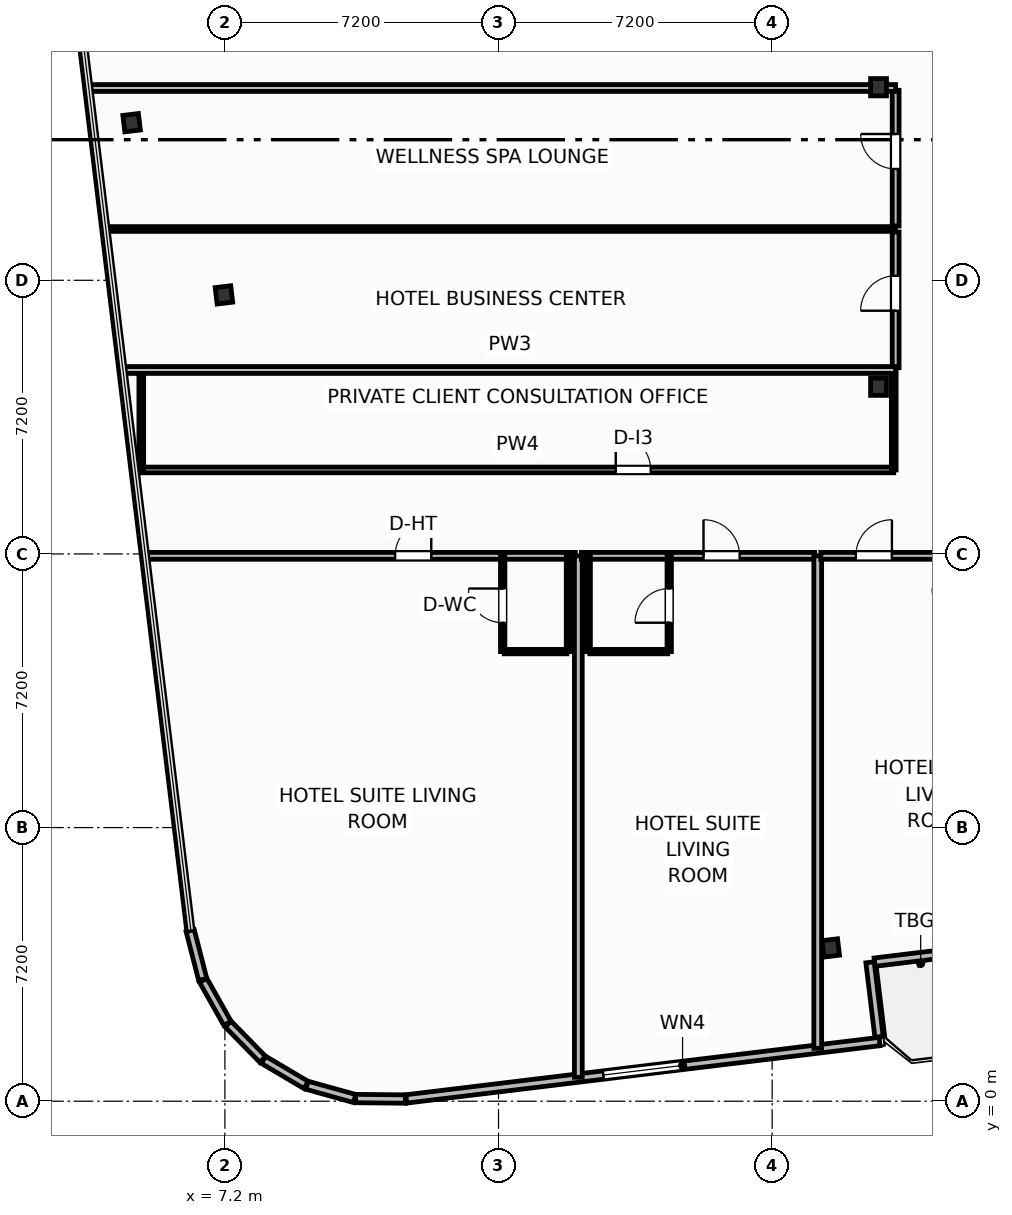
"""IFC4 building model, lengths in metres.
Left out: names, types, materials, properties, quantities, classifications, styles, units other than length and angle.
Written with IfcOpenShell. Run it as: python <this file> out.ifc"""

import sys

from ifc_helpers import new_model, si_unit, direction, frame, frame_2d, origin, origin_2d, place, context, subcontext, project, spatial, rectangle, i_section, extrude, element, fill, save


model = new_model("IFC4")
c1 = context("Model", 3, precision=1e-05, world=origin(), true_north=direction((0.0, 1.0)))
c2 = subcontext(c1, "Body", "Model", "MODEL_VIEW")
j1 = project(units=[si_unit("LENGTHUNIT", "METRE"), si_unit("PLANEANGLEUNIT", "RADIAN")], contexts=[c1])
p1 = place(None, origin())
s1 = spatial("IfcSite", under=j1, at=p1, CompositionType="ELEMENT")
p2 = place(p1, origin())
s2 = spatial("IfcBuilding", under=s1, at=p2, CompositionType="ELEMENT")
p3 = place(p2, frame((0.0, 0.0, 200.5)))
s3 = spatial("IfcBuildingStorey", under=s2, at=p3, CompositionType="ELEMENT", Elevation=200.5)
for number, where, z_axis, x_axis in (
    (1, (24.4, 18.8, 0.0), (0.0, 0.0, 1.0), (1.0, 0.0, 0.0)),
    (2, (24.4, 26.68, 0.0), (0.0, 0.0, 1.0), (1.0, 0.0, 0.0)),
):
    element("IfcColumn", number, at=place(p3, frame(where, z_axis=z_axis, x_axis=x_axis)), inside=s3, PredefinedType="COLUMN", context=c2, shape_type="SweptSolid", body=[
        extrude(i_section(OverallWidth=0.418, OverallDepth=0.455, WebThickness=0.042, FlangeThickness=0.068, FilletRadius=0.025, at=origin_2d()), origin(), (0.0, 0.0, 1.0), 3.7),
    ])
for number, where, z_axis, x_axis in (
    (3, (23.143, 4.033, 0.0), (0.0, 0.0, 1.0), (0.993, 0.12, 0.0)),
    (4, (4.746, 25.747, 0.0), (0.0, 0.0, 1.0), (0.993, 0.12, 0.0)),
    (5, (7.175, 21.216, 0.0), (0.0, 0.0, 1.0), (0.993, 0.12, 0.0)),
):
    element("IfcColumn", number, at=place(p3, frame(where, z_axis=z_axis, x_axis=x_axis)), inside=s3, PredefinedType="COLUMN", context=c2, shape_type="SweptSolid", body=[
        extrude(i_section(OverallWidth=0.412, OverallDepth=0.435, WebThickness=0.036, FlangeThickness=0.057, FilletRadius=0.025, at=origin_2d()), origin(), (0.0, 0.0, 1.0), 3.7),
    ])
p4 = place(p3, frame((30.252, 4.381, 0.0), z_axis=(0.0, 0.0, 1.0), x_axis=(-0.992735402148, -0.120318000826, 0.0)))
e6 = element("IfcWall", 6, at=p4, inside=s3, PredefinedType="SOLIDWALL", context=c2, shape_type="SweptSolid", body=[
    extrude(rectangle(XDim=6.0, YDim=0.22, at=frame_2d((3.0, 0.0))), origin(), (0.0, 0.0, 1.0), 2.73),
])
p5 = place(p4, frame((2.012, 0.0, 0.0)))
e7 = element("IfcOpeningElement", 7, at=p5, cuts=e6, PredefinedType="OPENING", context=c2, shape_type="SweptSolid", body=[
    extrude(rectangle(XDim=2.1, YDim=2.3, at=frame_2d((1.05, 1.15))), frame((0.0, 0.12, 0.0), z_axis=(0.0, -1.0, 0.0), x_axis=(1.0, 0.0, 0.0)), (0.0, 0.0, 1.0), 0.24),
])
p6 = place(p3, frame((6.286, 4.488, 0.0), z_axis=(0.0, 0.0, 1.0), x_axis=(0.248942347653, -0.968518305219, 0.0)))
e8 = element("IfcWall", 8, at=p6, inside=s3, PredefinedType="SOLIDWALL", context=c2, shape_type="SweptSolid", body=[
    extrude(rectangle(XDim=1.326, YDim=0.22, at=frame_2d((0.663, 0.0))), origin(), (0.0, 0.0, 1.0), 2.73),
])
for number, where, z_axis, x_axis in (
    (9, (6.629, 3.182, 0.0), (0.0, 0.0, 1.0), (0.491, -0.871, 0.0)),
    (10, (7.285, 2.031, 0.0), (0.0, 0.0, 1.0), (0.7, -0.714, 0.0)),
    (11, (8.217, 1.089, 0.0), (0.0, 0.0, 1.0), (0.861, -0.509, 0.0)),
):
    element("IfcWall", number, at=place(p3, frame(where, z_axis=z_axis, x_axis=x_axis)), inside=s3, PredefinedType="SOLIDWALL", context=c2, shape_type="SweptSolid", body=[
        extrude(rectangle(XDim=1.301, YDim=0.22, at=frame_2d((0.65, 0.0))), origin(), (0.0, 0.0, 1.0), 2.73),
    ])
p7 = place(p3, frame((9.361, 0.42, 0.0), z_axis=(0.0, 0.0, 1.0), x_axis=(0.963218895288, -0.268717992997, 0.0)))
e12 = element("IfcWall", 12, at=p7, inside=s3, PredefinedType="SOLIDWALL", context=c2, shape_type="SweptSolid", body=[
    extrude(rectangle(XDim=1.301, YDim=0.22, at=frame_2d((0.65, 0.0))), origin(), (0.0, 0.0, 1.0), 2.73),
])
p8 = place(p3, frame((10.639, 0.07, 0.0), z_axis=(0.0, 0.0, 1.0), x_axis=(0.999947377741, -0.010258740119, 0.0)))
e13 = element("IfcWall", 13, at=p8, inside=s3, PredefinedType="SOLIDWALL", context=c2, shape_type="SweptSolid", body=[
    extrude(rectangle(XDim=1.309, YDim=0.22, at=frame_2d((0.654, 0.0))), origin(), (0.0, 0.0, 1.0), 2.73),
])
p9 = place(p3, frame((11.972, 0.06, 0.0), z_axis=(0.0, 0.0, 1.0), x_axis=(0.992732021049, 0.120345894751, 0.0)))
e14 = element("IfcWall", 14, at=p9, inside=s3, PredefinedType="SOLIDWALL", context=c2, shape_type="SweptSolid", body=[
    extrude(rectangle(XDim=12.547, YDim=0.22, at=frame_2d((6.274, 0.0))), origin(), (0.0, 0.0, 1.0), 2.73),
])
p10 = place(p9, frame((5.224, 0.0, 0.8)))
e15 = element("IfcOpeningElement", 15, at=p10, cuts=e14, PredefinedType="OPENING", context=c2, shape_type="SweptSolid", body=[
    extrude(rectangle(XDim=2.1, YDim=1.75, at=frame_2d((1.05, 0.875))), frame((0.0, 0.12, 0.0), z_axis=(0.0, -1.0, 0.0), x_axis=(1.0, 0.0, 0.0)), (0.0, 0.0, 1.0), 0.24),
])
p11 = place(p3, frame((24.413, 1.694, 0.0), z_axis=(0.0, 0.0, 1.0), x_axis=(-0.120290754542, 0.992738703976, 0.0)))
e16 = element("IfcWall", 16, at=p11, inside=s3, PredefinedType="SOLIDWALL", context=c2, shape_type="SweptSolid", body=[
    extrude(rectangle(XDim=1.975, YDim=0.22, at=frame_2d((0.987, 0.0))), origin(), (0.0, 0.0, 1.0), 2.73),
])
p12 = place(p3, frame((5.0, 16.61, 0.0), z_axis=(0.0, 0.0, 1.0), x_axis=(1.0, 0.0, 0.0)))
e17 = element("IfcWall", 17, at=p12, inside=s3, PredefinedType="PARTITIONING", context=c2, shape_type="SweptSolid", body=[
    extrude(rectangle(XDim=19.8, YDim=0.15, at=frame_2d((9.9, 0.0))), origin(), (0.0, 0.0, 1.0), 3.45),
])
p13 = place(p12, frame((12.485, 0.0, 0.0)))
e18 = element("IfcOpeningElement", 18, at=p13, cuts=e17, PredefinedType="OPENING", context=c2, shape_type="SweptSolid", body=[
    extrude(rectangle(XDim=0.92, YDim=2.05, at=frame_2d((0.46, 1.025))), frame((0.0, 0.085, 0.0), z_axis=(0.0, -1.0, 0.0), x_axis=(1.0, 0.0, 0.0)), (0.0, 0.0, 1.0), 0.17),
])
for number, where, z_axis, x_axis in (
    (19, (5.0, 16.61, 0.0), (0.0, 0.0, 1.0), (0.0, 1.0, 0.0)),
    (20, (24.8, 16.61, 0.0), (0.0, 0.0, 1.0), (0.0, 1.0, 0.0)),
):
    element("IfcWall", number, at=place(p3, frame(where, z_axis=z_axis, x_axis=x_axis)), inside=s3, PredefinedType="PARTITIONING", context=c2, shape_type="SweptSolid", body=[
        extrude(rectangle(XDim=2.63, YDim=0.125, at=frame_2d((1.315, 0.0))), origin(), (0.0, 0.0, 1.0), 3.45),
    ])
p14 = place(p3, frame((5.15, 14.35, 0.0), z_axis=(0.0, 0.0, 1.0), x_axis=(1.0, 0.0, 0.0)))
e21 = element("IfcWall", 21, at=p14, inside=s3, PredefinedType="PARTITIONING", context=c2, shape_type="SweptSolid", body=[
    extrude(rectangle(XDim=11.27, YDim=0.18, at=frame_2d((5.635, 0.0))), origin(), (0.0, 0.0, 1.0), 3.45),
])
p15 = place(p14, frame((6.53, 0.0, 0.0)))
e22 = element("IfcOpeningElement", 22, at=p15, cuts=e21, PredefinedType="OPENING", context=c2, shape_type="SweptSolid", body=[
    extrude(rectangle(XDim=0.95, YDim=2.15, at=frame_2d((0.475, 1.075))), frame((0.0, 0.1, 0.0), z_axis=(0.0, -1.0, 0.0), x_axis=(1.0, 0.0, 0.0)), (0.0, 0.0, 1.0), 0.2),
])
p16 = place(p3, frame((14.55, 11.83, 0.0), z_axis=(0.0, 0.0, 1.0), x_axis=(1.0, 0.0, 0.0)))
e23 = element("IfcWall", 23, at=p16, inside=s3, PredefinedType="PARTITIONING", context=c2, shape_type="SweptSolid", body=[
    extrude(rectangle(XDim=1.65, YDim=0.115, at=frame_2d((0.825, 0.0))), origin(), (0.0, 0.0, 1.0), 3.45),
])
p17 = place(p3, frame((14.51, 11.83, 0.0), z_axis=(0.0, 0.0, 1.0), x_axis=(0.0, 1.0, 0.0)))
e24 = element("IfcWall", 24, at=p17, inside=s3, PredefinedType="PARTITIONING", context=c2, shape_type="SweptSolid", body=[
    extrude(rectangle(XDim=2.52, YDim=0.115, at=frame_2d((1.26, 0.0))), origin(), (0.0, 0.0, 1.0), 3.45),
])
p18 = place(p17, frame((0.76, 0.0, 0.0)))
e25 = element("IfcOpeningElement", 25, at=p18, cuts=e24, PredefinedType="OPENING", context=c2, shape_type="SweptSolid", body=[
    extrude(rectangle(XDim=0.9, YDim=2.05, at=frame_2d((0.45, 1.025))), frame((0.0, 0.067, 0.0), z_axis=(0.0, -1.0, 0.0), x_axis=(1.0, 0.0, 0.0)), (0.0, 0.0, 1.0), 0.135),
])
p19 = place(p3, frame((16.24, 11.83, 0.0), z_axis=(0.0, 0.0, 1.0), x_axis=(0.0, 1.0, 0.0)))
e26 = element("IfcWall", 26, at=p19, inside=s3, PredefinedType="PARTITIONING", context=c2, shape_type="SweptSolid", body=[
    extrude(rectangle(XDim=2.52, YDim=0.115, at=frame_2d((1.26, 0.0))), origin(), (0.0, 0.0, 1.0), 3.45),
])
p20 = place(p3, frame((16.5, 0.629, 0.0), z_axis=(0.0, 0.0, 1.0), x_axis=(0.0, 1.0, 0.0)))
e27 = element("IfcWall", 27, at=p20, inside=s3, PredefinedType="PARTITIONING", context=c2, shape_type="SweptSolid", body=[
    extrude(rectangle(XDim=13.721, YDim=0.205, at=frame_2d((6.861, 0.0))), origin(), (0.0, 0.0, 1.0), 3.45),
])
p21 = place(p3, frame((16.58, 14.35, 0.0), z_axis=(0.0, 0.0, 1.0), x_axis=(1.0, 0.0, 0.0)))
e28 = element("IfcWall", 28, at=p21, inside=s3, PredefinedType="PARTITIONING", context=c2, shape_type="SweptSolid", body=[
    extrude(rectangle(XDim=6.14, YDim=0.18, at=frame_2d((3.07, 0.0))), origin(), (0.0, 0.0, 1.0), 3.45),
])
p22 = place(p21, frame((3.214, 0.0, 0.0)))
e29 = element("IfcOpeningElement", 29, at=p22, cuts=e28, PredefinedType="OPENING", context=c2, shape_type="SweptSolid", body=[
    extrude(rectangle(XDim=0.95, YDim=2.15, at=frame_2d((0.475, 1.075))), frame((0.0, 0.1, 0.0), z_axis=(0.0, -1.0, 0.0), x_axis=(1.0, 0.0, 0.0)), (0.0, 0.0, 1.0), 0.2),
])
p23 = place(p3, frame((16.8, 11.83, 0.0), z_axis=(0.0, 0.0, 1.0), x_axis=(1.0, 0.0, 0.0)))
e30 = element("IfcWall", 30, at=p23, inside=s3, PredefinedType="PARTITIONING", context=c2, shape_type="SweptSolid", body=[
    extrude(rectangle(XDim=2.052, YDim=0.115, at=frame_2d((1.026, 0.0))), origin(), (0.0, 0.0, 1.0), 3.45),
])
p24 = place(p3, frame((18.892, 11.83, 0.0), z_axis=(0.0, 0.0, 1.0), x_axis=(0.0, 1.0, 0.0)))
e31 = element("IfcWall", 31, at=p24, inside=s3, PredefinedType="PARTITIONING", context=c2, shape_type="SweptSolid", body=[
    extrude(rectangle(XDim=2.52, YDim=0.115, at=frame_2d((1.26, 0.0))), origin(), (0.0, 0.0, 1.0), 3.45),
])
p25 = place(p24, frame((0.76, 0.0, 0.0)))
e32 = element("IfcOpeningElement", 32, at=p25, cuts=e31, PredefinedType="OPENING", context=c2, shape_type="SweptSolid", body=[
    extrude(rectangle(XDim=0.9, YDim=2.05, at=frame_2d((0.45, 1.025))), frame((0.0, 0.067, 0.0), z_axis=(0.0, -1.0, 0.0), x_axis=(1.0, 0.0, 0.0)), (0.0, 0.0, 1.0), 0.135),
])
p26 = place(p3, frame((16.76, 11.83, 0.0), z_axis=(0.0, 0.0, 1.0), x_axis=(0.0, 1.0, 0.0)))
e33 = element("IfcWall", 33, at=p26, inside=s3, PredefinedType="PARTITIONING", context=c2, shape_type="SweptSolid", body=[
    extrude(rectangle(XDim=2.52, YDim=0.115, at=frame_2d((1.26, 0.0))), origin(), (0.0, 0.0, 1.0), 3.45),
])
p27 = place(p3, frame((22.8, 1.393, 0.0), z_axis=(0.0, 0.0, 1.0), x_axis=(0.0, 1.0, 0.0)))
e34 = element("IfcWall", 34, at=p27, inside=s3, PredefinedType="PARTITIONING", context=c2, shape_type="SweptSolid", body=[
    extrude(rectangle(XDim=12.958, YDim=0.205, at=frame_2d((6.479, 0.0))), origin(), (0.0, 0.0, 1.0), 3.45),
])
p28 = place(p3, frame((22.88, 14.35, 0.0), z_axis=(0.0, 0.0, 1.0), x_axis=(1.0, 0.0, 0.0)))
e35 = element("IfcWall", 35, at=p28, inside=s3, PredefinedType="PARTITIONING", context=c2, shape_type="SweptSolid", body=[
    extrude(rectangle(XDim=6.14, YDim=0.18, at=frame_2d((3.07, 0.0))), origin(), (0.0, 0.0, 1.0), 3.45),
])
p29 = place(p28, frame((0.922, 0.0, 0.0)))
e36 = element("IfcOpeningElement", 36, at=p29, cuts=e35, PredefinedType="OPENING", context=c2, shape_type="SweptSolid", body=[
    extrude(rectangle(XDim=0.95, YDim=2.15, at=frame_2d((0.475, 1.075))), frame((0.0, 0.1, 0.0), z_axis=(0.0, -1.0, 0.0), x_axis=(1.0, 0.0, 0.0)), (0.0, 0.0, 1.0), 0.2),
])
p30 = place(p3, frame((24.85, 19.3, 0.0), z_axis=(0.0, 0.0, 1.0), x_axis=(0.0, 1.0, 0.0)))
e37 = element("IfcWall", 37, at=p30, inside=s3, PredefinedType="PARTITIONING", context=c2, shape_type="SweptSolid", body=[
    extrude(rectangle(XDim=3.57, YDim=0.18, at=frame_2d((1.785, 0.0))), origin(), (0.0, 0.0, 1.0), 3.45),
])
p31 = place(p30, frame((1.5, 0.0, 0.0)))
e38 = element("IfcOpeningElement", 38, at=p31, cuts=e37, PredefinedType="OPENING", context=c2, shape_type="SweptSolid", body=[
    extrude(rectangle(XDim=0.92, YDim=2.05, at=frame_2d((0.46, 1.025))), frame((0.0, 0.1, 0.0), z_axis=(0.0, -1.0, 0.0), x_axis=(1.0, 0.0, 0.0)), (0.0, 0.0, 1.0), 0.2),
])
p32 = place(p3, frame((24.85, 23.03, 0.0), z_axis=(0.0, 0.0, 1.0), x_axis=(0.0, 1.0, 0.0)))
e39 = element("IfcWall", 39, at=p32, inside=s3, PredefinedType="PARTITIONING", context=c2, shape_type="SweptSolid", body=[
    extrude(rectangle(XDim=3.57, YDim=0.18, at=frame_2d((1.785, 0.0))), origin(), (0.0, 0.0, 1.0), 3.45),
])
p33 = place(p32, frame((1.5, 0.0, 0.0)))
e40 = element("IfcOpeningElement", 40, at=p33, cuts=e39, PredefinedType="OPENING", context=c2, shape_type="SweptSolid", body=[
    extrude(rectangle(XDim=0.92, YDim=2.05, at=frame_2d((0.46, 1.025))), frame((0.0, 0.1, 0.0), z_axis=(0.0, -1.0, 0.0), x_axis=(1.0, 0.0, 0.0)), (0.0, 0.0, 1.0), 0.2),
])
p34 = place(p3, frame((4.107, 22.95, 0.0), z_axis=(0.0, 0.0, 1.0), x_axis=(1.0, 0.0, 0.0)))
e41 = element("IfcWall", 41, at=p34, inside=s3, PredefinedType="PARTITIONING", context=c2, shape_type="SweptSolid", body=[
    extrude(rectangle(XDim=20.743, YDim=0.125, at=frame_2d((10.371, 0.0))), origin(), (0.0, 0.0, 1.0), 2.662),
])
p35 = place(p3, frame((4.557, 19.24, 0.0), z_axis=(0.0, 0.0, 1.0), x_axis=(1.0, 0.0, 0.0)))
e42 = element("IfcWall", 42, at=p35, inside=s3, PredefinedType="PARTITIONING", context=c2, shape_type="SweptSolid", body=[
    extrude(rectangle(XDim=20.293, YDim=0.18, at=frame_2d((10.146, 0.0))), origin(), (0.0, 0.0, 1.0), 3.45),
])
p36 = place(p3, frame((3.658, 26.66, 0.0), z_axis=(0.0, 0.0, 1.0), x_axis=(1.0, 0.0, 0.0)))
e43 = element("IfcWall", 43, at=p36, inside=s3, PredefinedType="PARTITIONING", context=c2, shape_type="SweptSolid", body=[
    extrude(rectangle(XDim=21.192, YDim=0.18, at=frame_2d((10.596, 0.0))), origin(), (0.0, 0.0, 1.0), 2.662),
])
p37 = place(p10, origin())
e44 = element("IfcWindow", 44, at=p37, inside=s3, PartitioningType="SINGLE_PANEL", PredefinedType="WINDOW", context=c2, shape_type="SweptSolid", body=[
    extrude(rectangle(XDim=2.1, YDim=1.75, at=frame_2d((1.05, 0.875))), frame((0.0, 0.03, 0.0), z_axis=(0.0, -1.0, 0.0), x_axis=(1.0, 0.0, 0.0)), (0.0, 0.0, 1.0), 0.06),
])
fill(e15, e44)
p38 = place(p13, origin())
e45 = element("IfcDoor", 45, at=p38, inside=s3, OperationType="SINGLE_SWING_LEFT", PredefinedType="DOOR", context=c2, shape_type="SweptSolid", body=[
    extrude(rectangle(XDim=0.92, YDim=2.05, at=frame_2d((0.46, 1.025))), frame((0.0, 0.025, 0.0), z_axis=(0.0, -1.0, 0.0), x_axis=(1.0, 0.0, 0.0)), (0.0, 0.0, 1.0), 0.05),
])
fill(e18, e45)
p39 = place(p15, origin())
e46 = element("IfcDoor", 46, at=p39, inside=s3, OperationType="SINGLE_SWING_RIGHT", PredefinedType="DOOR", context=c2, shape_type="SweptSolid", body=[
    extrude(rectangle(XDim=0.95, YDim=2.15, at=frame_2d((0.475, 1.075))), frame((0.0, 0.025, 0.0), z_axis=(0.0, -1.0, 0.0), x_axis=(1.0, 0.0, 0.0)), (0.0, 0.0, 1.0), 0.05),
])
fill(e22, e46)
p40 = place(p18, origin())
e47 = element("IfcDoor", 47, at=p40, inside=s3, OperationType="SINGLE_SWING_RIGHT", PredefinedType="DOOR", context=c2, shape_type="SweptSolid", body=[
    extrude(rectangle(XDim=0.9, YDim=2.05, at=frame_2d((0.45, 1.025))), frame((0.0, 0.025, 0.0), z_axis=(0.0, -1.0, 0.0), x_axis=(1.0, 0.0, 0.0)), (0.0, 0.0, 1.0), 0.05),
])
fill(e25, e47)
p41 = place(p22, origin())
e48 = element("IfcDoor", 48, at=p41, inside=s3, OperationType="SINGLE_SWING_LEFT", PredefinedType="DOOR", context=c2, shape_type="SweptSolid", body=[
    extrude(rectangle(XDim=0.95, YDim=2.15, at=frame_2d((0.475, 1.075))), frame((0.0, 0.025, 0.0), z_axis=(0.0, -1.0, 0.0), x_axis=(1.0, 0.0, 0.0)), (0.0, 0.0, 1.0), 0.05),
])
fill(e29, e48)
p42 = place(p25, origin())
e49 = element("IfcDoor", 49, at=p42, inside=s3, OperationType="SINGLE_SWING_LEFT", PredefinedType="DOOR", context=c2, shape_type="SweptSolid", body=[
    extrude(rectangle(XDim=0.9, YDim=2.05, at=frame_2d((0.45, 1.025))), frame((0.0, 0.025, 0.0), z_axis=(0.0, -1.0, 0.0), x_axis=(1.0, 0.0, 0.0)), (0.0, 0.0, 1.0), 0.05),
])
fill(e32, e49)
p43 = place(p29, origin())
e50 = element("IfcDoor", 50, at=p43, inside=s3, OperationType="SINGLE_SWING_RIGHT", PredefinedType="DOOR", context=c2, shape_type="SweptSolid", body=[
    extrude(rectangle(XDim=0.95, YDim=2.15, at=frame_2d((0.475, 1.075))), frame((0.0, 0.025, 0.0), z_axis=(0.0, -1.0, 0.0), x_axis=(1.0, 0.0, 0.0)), (0.0, 0.0, 1.0), 0.05),
])
fill(e36, e50)
p44 = place(p31, origin())
e51 = element("IfcDoor", 51, at=p44, inside=s3, OperationType="SINGLE_SWING_LEFT", PredefinedType="DOOR", context=c2, shape_type="SweptSolid", body=[
    extrude(rectangle(XDim=0.92, YDim=2.05, at=frame_2d((0.46, 1.025))), frame((0.0, 0.025, 0.0), z_axis=(0.0, -1.0, 0.0), x_axis=(1.0, 0.0, 0.0)), (0.0, 0.0, 1.0), 0.05),
])
fill(e38, e51)
p45 = place(p33, origin())
e52 = element("IfcDoor", 52, at=p45, inside=s3, OperationType="SINGLE_SWING_RIGHT", PredefinedType="DOOR", context=c2, shape_type="SweptSolid", body=[
    extrude(rectangle(XDim=0.92, YDim=2.05, at=frame_2d((0.46, 1.025))), frame((0.0, 0.025, 0.0), z_axis=(0.0, -1.0, 0.0), x_axis=(1.0, 0.0, 0.0)), (0.0, 0.0, 1.0), 0.05),
])
fill(e40, e52)
save(model, sys.argv[1])
